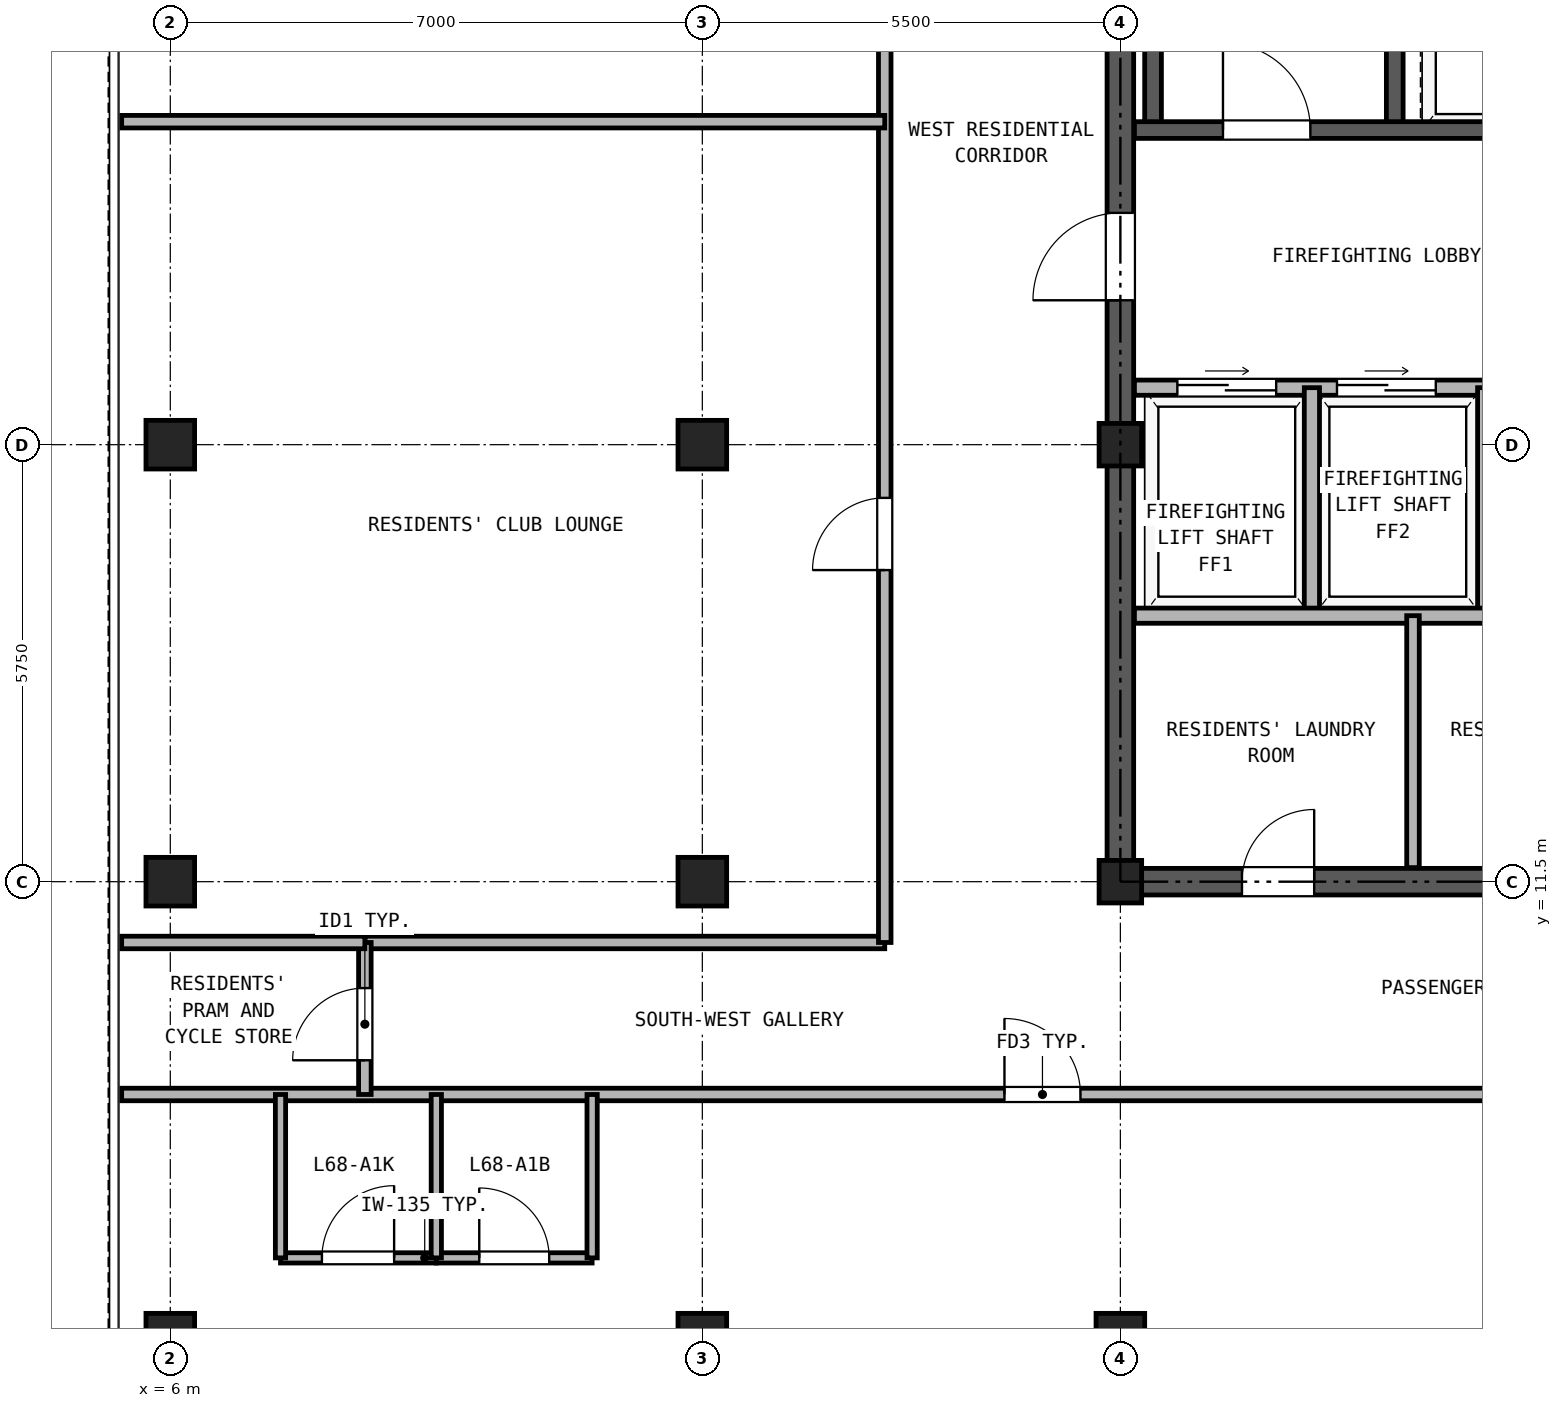
"""IFC4 building model, lengths in metres.
Left out: names, types, materials, properties, quantities, classifications, styles, units other than length and angle.
Written with IfcOpenShell. Run it as: python <this file> out.ifc"""

import sys

from ifc_helpers import new_model, si_unit, direction, frame, frame_2d, origin, origin_2d, place, context, subcontext, project, spatial, rectangle, hollow_rectangle, extrude, source, transform, mapped, element, fill, save


model = new_model("IFC4")
c1 = context("Model", 3, precision=1e-05, world=origin(), true_north=direction((0.0, 1.0)))
c2 = subcontext(c1, "Body", "Model", "MODEL_VIEW")
j1 = project(units=[si_unit("LENGTHUNIT", "METRE"), si_unit("PLANEANGLEUNIT", "RADIAN")], contexts=[c1])
p1 = place(None, origin())
s1 = spatial("IfcSite", under=j1, at=p1, CompositionType="ELEMENT")
p2 = place(p1, origin())
s2 = spatial("IfcBuilding", under=s1, at=p2, CompositionType="ELEMENT")
p3 = place(p2, frame((0.0, 0.0, 239.3)))
s3 = spatial("IfcBuildingStorey", under=s2, at=p3, CompositionType="ELEMENT", Elevation=239.3)
m1 = source(origin(), c2, "Body", "SweptSolid", [
    extrude(hollow_rectangle(XDim=0.64, YDim=0.64, WallThickness=0.035, at=origin_2d()), origin(), (0.0, 0.0, 1.0), 2.98),
])
for number, where, z_axis, x_axis in (
    (1, (6.0, 5.5, 0.0), (0.0, 0.0, 1.0), (1.0, 0.0, 0.0)),
    (2, (6.0, 11.5, 0.0), (0.0, 0.0, 1.0), (1.0, 0.0, 0.0)),
    (3, (6.0, 17.25, 0.0), (0.0, 0.0, 1.0), (1.0, 0.0, 0.0)),
    (4, (13.0, 5.5, 0.0), (0.0, 0.0, 1.0), (1.0, 0.0, 0.0)),
    (5, (13.0, 11.5, 0.0), (0.0, 0.0, 1.0), (1.0, 0.0, 0.0)),
    (6, (13.0, 17.25, 0.0), (0.0, 0.0, 1.0), (1.0, 0.0, 0.0)),
    (7, (18.5, 5.5, 0.0), (0.0, 0.0, 1.0), (1.0, 0.0, 0.0)),
):
    element("IfcColumn", number, at=place(p3, frame(where, z_axis=z_axis, x_axis=x_axis)), inside=s3, PredefinedType="COLUMN", context=c2, shape_type="MappedRepresentation", body=[
        mapped(m1, transform((0.0, 0.0, 0.0), x_axis=(1.0, 0.0, 0.0), y_axis=(0.0, 1.0, 0.0), z_axis=(0.0, 0.0, 1.0), scale=1.0)),
    ])
m2 = source(origin(), c2, "Body", "SweptSolid", [
    extrude(hollow_rectangle(XDim=0.56, YDim=0.56, WallThickness=0.03, at=origin_2d()), origin(), (0.0, 0.0, 1.0), 2.98),
])
for number, where, z_axis, x_axis in (
    (8, (18.5, 11.5, 0.0), (0.0, 0.0, 1.0), (1.0, 0.0, 0.0)),
    (9, (18.5, 17.25, 0.0), (0.0, 0.0, 1.0), (1.0, 0.0, 0.0)),
):
    element("IfcColumn", number, at=place(p3, frame(where, z_axis=z_axis, x_axis=x_axis)), inside=s3, PredefinedType="COLUMN", context=c2, shape_type="MappedRepresentation", body=[
        mapped(m2, transform((0.0, 0.0, 0.0), x_axis=(1.0, 0.0, 0.0), y_axis=(0.0, 1.0, 0.0), z_axis=(0.0, 0.0, 1.0), scale=1.0)),
    ])
p4 = place(p3, frame((18.325, 11.5, 0.0), z_axis=(0.0, 0.0, 1.0), x_axis=(1.0, 0.0, 0.0)))
e10 = element("IfcWall", 10, at=p4, inside=s3, PredefinedType="SHEAR", context=c2, shape_type="SweptSolid", body=[
    extrude(rectangle(XDim=10.35, YDim=0.35, at=frame_2d((5.175, 0.0))), origin(), (0.0, 0.0, 1.0), 2.98),
])
p5 = place(p4, frame((1.775, 0.0, 0.0)))
e11 = element("IfcOpeningElement", 11, at=p5, cuts=e10, PredefinedType="OPENING", context=c2, shape_type="SweptSolid", body=[
    extrude(rectangle(XDim=0.95, YDim=2.15, at=frame_2d((0.475, 1.075))), frame((0.0, 0.185, 0.0), z_axis=(0.0, -1.0, 0.0), x_axis=(1.0, 0.0, 0.0)), (0.0, 0.0, 1.0), 0.37),
])
p6 = place(p4, frame((5.275, 0.0, 0.0)))
e12 = element("IfcOpeningElement", 12, at=p6, cuts=e10, PredefinedType="OPENING", context=c2, shape_type="SweptSolid", body=[
    extrude(rectangle(XDim=0.95, YDim=2.15, at=frame_2d((0.475, 1.075))), frame((0.0, 0.185, 0.0), z_axis=(0.0, -1.0, 0.0), x_axis=(1.0, 0.0, 0.0)), (0.0, 0.0, 1.0), 0.37),
])
p7 = place(p4, frame((8.175, 0.0, 0.0)))
e13 = element("IfcOpeningElement", 13, at=p7, cuts=e10, PredefinedType="OPENING", context=c2, shape_type="SweptSolid", body=[
    extrude(rectangle(XDim=1.1, YDim=2.25, at=frame_2d((0.55, 1.125))), frame((0.0, 0.185, 0.0), z_axis=(0.0, -1.0, 0.0), x_axis=(1.0, 0.0, 0.0)), (0.0, 0.0, 1.0), 0.37),
])
p8 = place(p3, frame((18.5, 11.675, 0.0), z_axis=(0.0, 0.0, 1.0), x_axis=(0.0, 1.0, 0.0)))
e14 = element("IfcWall", 14, at=p8, inside=s3, PredefinedType="SHEAR", context=c2, shape_type="SweptSolid", body=[
    extrude(rectangle(XDim=16.9, YDim=0.35, at=frame_2d((8.45, 0.0))), origin(), (0.0, 0.0, 1.0), 2.98),
])
p9 = place(p8, frame((7.475, 0.0, 0.0)))
e15 = element("IfcOpeningElement", 15, at=p9, cuts=e14, PredefinedType="OPENING", context=c2, shape_type="SweptSolid", body=[
    extrude(rectangle(XDim=1.15, YDim=2.2, at=frame_2d((0.575, 1.1))), frame((0.0, 0.185, 0.0), z_axis=(0.0, -1.0, 0.0), x_axis=(1.0, 0.0, 0.0)), (0.0, 0.0, 1.0), 0.37),
])
for number, where, z_axis, x_axis in (
    (16, (18.93, 21.39, 0.0), (0.0, 0.0, 1.0), (0.0, 1.0, 0.0)),
    (17, (22.11, 21.39, 0.0), (0.0, 0.0, 1.0), (0.0, 1.0, 0.0)),
):
    element("IfcWall", number, at=place(p3, frame(where, z_axis=z_axis, x_axis=x_axis)), inside=s3, PredefinedType="SOLIDWALL", context=c2, shape_type="SweptSolid", body=[
        extrude(rectangle(XDim=7.11, YDim=0.22, at=frame_2d((3.555, 0.0))), origin(), (0.0, 0.0, 1.0), 2.98),
    ])
p10 = place(p3, frame((18.685, 21.39, 0.0), z_axis=(0.0, 0.0, 1.0), x_axis=(1.0, 0.0, 0.0)))
e18 = element("IfcWall", 18, at=p10, inside=s3, PredefinedType="SOLIDWALL", context=c2, shape_type="SweptSolid", body=[
    extrude(rectangle(XDim=6.445, YDim=0.22, at=frame_2d((3.222, 0.0))), origin(), (0.0, 0.0, 1.0), 2.98),
])
p11 = place(p10, frame((1.165, 0.0, 0.0)))
e19 = element("IfcOpeningElement", 19, at=p11, cuts=e18, PredefinedType="OPENING", context=c2, shape_type="SweptSolid", body=[
    extrude(rectangle(XDim=1.15, YDim=2.2, at=frame_2d((0.575, 1.1))), frame((0.0, 0.12, 0.0), z_axis=(0.0, -1.0, 0.0), x_axis=(1.0, 0.0, 0.0)), (0.0, 0.0, 1.0), 0.24),
])
p12 = place(p10, frame((4.895, 0.0, 0.0)))
e20 = element("IfcOpeningElement", 20, at=p12, cuts=e18, PredefinedType="OPENING", context=c2, shape_type="SweptSolid", body=[
    extrude(rectangle(XDim=1.1, YDim=2.25, at=frame_2d((0.55, 1.125))), frame((0.0, 0.12, 0.0), z_axis=(0.0, -1.0, 0.0), x_axis=(1.0, 0.0, 0.0)), (0.0, 0.0, 1.0), 0.24),
])
p13 = place(p3, frame((18.685, 18.0, 0.0), z_axis=(0.0, 0.0, 1.0), x_axis=(1.0, 0.0, 0.0)))
e21 = element("IfcWall", 21, at=p13, inside=s3, PredefinedType="PARTITIONING", context=c2, shape_type="SweptSolid", body=[
    extrude(rectangle(XDim=9.63, YDim=0.2, at=frame_2d((4.815, 0.0))), origin(), (0.0, 0.0, 1.0), 2.98),
])
p14 = place(p13, frame((0.565, 0.0, 0.0)))
e22 = element("IfcOpeningElement", 22, at=p14, cuts=e21, PredefinedType="OPENING", context=c2, shape_type="SweptSolid", body=[
    extrude(rectangle(XDim=1.3, YDim=2.3, at=frame_2d((0.65, 1.15))), frame((0.0, 0.11, 0.0), z_axis=(0.0, -1.0, 0.0), x_axis=(1.0, 0.0, 0.0)), (0.0, 0.0, 1.0), 0.22),
])
p15 = place(p13, frame((2.665, 0.0, 0.0)))
e23 = element("IfcOpeningElement", 23, at=p15, cuts=e21, PredefinedType="OPENING", context=c2, shape_type="SweptSolid", body=[
    extrude(rectangle(XDim=1.3, YDim=2.3, at=frame_2d((0.65, 1.15))), frame((0.0, 0.11, 0.0), z_axis=(0.0, -1.0, 0.0), x_axis=(1.0, 0.0, 0.0)), (0.0, 0.0, 1.0), 0.22),
])
p16 = place(p13, frame((5.065, 0.0, 0.0)))
e24 = element("IfcOpeningElement", 24, at=p16, cuts=e21, PredefinedType="OPENING", context=c2, shape_type="SweptSolid", body=[
    extrude(rectangle(XDim=0.9, YDim=2.05, at=frame_2d((0.45, 1.025))), frame((0.0, 0.11, 0.0), z_axis=(0.0, -1.0, 0.0), x_axis=(1.0, 0.0, 0.0)), (0.0, 0.0, 1.0), 0.22),
])
p17 = place(p13, frame((7.765, 0.0, 0.0)))
e25 = element("IfcOpeningElement", 25, at=p17, cuts=e21, PredefinedType="OPENING", context=c2, shape_type="SweptSolid", body=[
    extrude(rectangle(XDim=0.9, YDim=2.05, at=frame_2d((0.45, 1.025))), frame((0.0, 0.11, 0.0), z_axis=(0.0, -1.0, 0.0), x_axis=(1.0, 0.0, 0.0)), (0.0, 0.0, 1.0), 0.22),
])
for number, where, z_axis, x_axis in (
    (26, (21.02, 15.0, 0.0), (0.0, 0.0, 1.0), (0.0, 1.0, 0.0)),
    (27, (23.3, 15.0, 0.0), (0.0, 0.0, 1.0), (0.0, 1.0, 0.0)),
):
    element("IfcWall", number, at=place(p3, frame(where, z_axis=z_axis, x_axis=x_axis)), inside=s3, PredefinedType="PARTITIONING", context=c2, shape_type="SweptSolid", body=[
        extrude(rectangle(XDim=3.0, YDim=0.2, at=frame_2d((1.5, 0.0))), origin(), (0.0, 0.0, 1.0), 2.98),
    ])
p18 = place(p3, frame((18.685, 15.0, 0.0), z_axis=(0.0, 0.0, 1.0), x_axis=(1.0, 0.0, 0.0)))
e28 = element("IfcWall", 28, at=p18, inside=s3, PredefinedType="PARTITIONING", context=c2, shape_type="SweptSolid", body=[
    extrude(rectangle(XDim=9.63, YDim=0.2, at=frame_2d((4.815, 0.0))), origin(), (0.0, 0.0, 1.0), 2.98),
])
p19 = place(p3, frame((22.35, 11.685, 0.0), z_axis=(0.0, 0.0, 1.0), x_axis=(0.0, 1.0, 0.0)))
e29 = element("IfcWall", 29, at=p19, inside=s3, PredefinedType="PARTITIONING", context=c2, shape_type="SweptSolid", body=[
    extrude(rectangle(XDim=3.315, YDim=0.165, at=frame_2d((1.657, 0.0))), origin(), (0.0, 0.0, 1.0), 2.98),
])
p20 = place(p3, frame((5.36, 8.7, 0.0), z_axis=(0.0, 0.0, 1.0), x_axis=(1.0, 0.0, 0.0)))
e30 = element("IfcWall", 30, at=p20, inside=s3, PredefinedType="PARTITIONING", context=c2, shape_type="SweptSolid", body=[
    extrude(rectangle(XDim=36.28, YDim=0.165, at=frame_2d((18.14, 0.0))), origin(), (0.0, 0.0, 1.0), 2.655),
])
p21 = place(p20, frame((11.615, 0.0, 0.0)))
e31 = element("IfcOpeningElement", 31, at=p21, cuts=e30, PredefinedType="OPENING", context=c2, shape_type="SweptSolid", body=[
    extrude(rectangle(XDim=1.0, YDim=2.15, at=frame_2d((0.5, 1.075))), frame((0.0, 0.093, 0.0), z_axis=(0.0, -1.0, 0.0), x_axis=(1.0, 0.0, 0.0)), (0.0, 0.0, 1.0), 0.185),
])
p22 = place(p20, frame((23.665, 0.0, 0.0)))
e32 = element("IfcOpeningElement", 32, at=p22, cuts=e30, PredefinedType="OPENING", context=c2, shape_type="SweptSolid", body=[
    extrude(rectangle(XDim=1.0, YDim=2.15, at=frame_2d((0.5, 1.075))), frame((0.0, 0.093, 0.0), z_axis=(0.0, -1.0, 0.0), x_axis=(1.0, 0.0, 0.0)), (0.0, 0.0, 1.0), 0.185),
])
p23 = place(p3, frame((8.56, 10.7, 0.0), z_axis=(0.0, 0.0, 1.0), x_axis=(1.0, 0.0, 0.0)))
e33 = element("IfcWall", 33, at=p23, inside=s3, PredefinedType="PARTITIONING", context=c2, shape_type="SweptSolid", body=[
    extrude(rectangle(XDim=6.84, YDim=0.165, at=frame_2d((3.42, 0.0))), origin(), (0.0, 0.0, 1.0), 2.98),
])
p24 = place(p3, frame((8.56, 8.7, 0.0), z_axis=(0.0, 0.0, 1.0), x_axis=(0.0, 1.0, 0.0)))
e34 = element("IfcWall", 34, at=p24, inside=s3, PredefinedType="PARTITIONING", context=c2, shape_type="SweptSolid", body=[
    extrude(rectangle(XDim=2.0, YDim=0.165, at=frame_2d((1.0, 0.0))), origin(), (0.0, 0.0, 1.0), 2.98),
])
p25 = place(p24, frame((0.45, 0.0, 0.0)))
e35 = element("IfcOpeningElement", 35, at=p25, cuts=e34, PredefinedType="OPENING", context=c2, shape_type="SweptSolid", body=[
    extrude(rectangle(XDim=0.95, YDim=2.15, at=frame_2d((0.475, 1.075))), frame((0.0, 0.093, 0.0), z_axis=(0.0, -1.0, 0.0), x_axis=(1.0, 0.0, 0.0)), (0.0, 0.0, 1.0), 0.185),
])
p26 = place(p3, frame((15.4, 10.7, 0.0), z_axis=(0.0, 0.0, 1.0), x_axis=(0.0, 1.0, 0.0)))
e36 = element("IfcWall", 36, at=p26, inside=s3, PredefinedType="PARTITIONING", context=c2, shape_type="SweptSolid", body=[
    extrude(rectangle(XDim=24.44, YDim=0.165, at=frame_2d((12.22, 0.0))), origin(), (0.0, 0.0, 1.0), 2.98),
])
p27 = place(p26, frame((4.9, 0.0, 0.0)))
e37 = element("IfcOpeningElement", 37, at=p27, cuts=e36, PredefinedType="OPENING", context=c2, shape_type="SweptSolid", body=[
    extrude(rectangle(XDim=0.95, YDim=2.15, at=frame_2d((0.475, 1.075))), frame((0.0, 0.093, 0.0), z_axis=(0.0, -1.0, 0.0), x_axis=(1.0, 0.0, 0.0)), (0.0, 0.0, 1.0), 0.185),
])
p28 = place(p26, frame((13.8, 0.0, 0.0)))
e38 = element("IfcOpeningElement", 38, at=p28, cuts=e36, PredefinedType="OPENING", context=c2, shape_type="SweptSolid", body=[
    extrude(rectangle(XDim=0.95, YDim=2.15, at=frame_2d((0.475, 1.075))), frame((0.0, 0.093, 0.0), z_axis=(0.0, -1.0, 0.0), x_axis=(1.0, 0.0, 0.0)), (0.0, 0.0, 1.0), 0.185),
])
p29 = place(p26, frame((18.7, 0.0, 0.0)))
e39 = element("IfcOpeningElement", 39, at=p29, cuts=e36, PredefinedType="OPENING", context=c2, shape_type="SweptSolid", body=[
    extrude(rectangle(XDim=0.95, YDim=2.15, at=frame_2d((0.475, 1.075))), frame((0.0, 0.093, 0.0), z_axis=(0.0, -1.0, 0.0), x_axis=(1.0, 0.0, 0.0)), (0.0, 0.0, 1.0), 0.185),
])
p30 = place(p3, frame((7.45, 6.55, 0.0), z_axis=(0.0, 0.0, 1.0), x_axis=(1.0, 0.0, 0.0)))
e40 = element("IfcWall", 40, at=p30, inside=s3, PredefinedType="PARTITIONING", context=c2, shape_type="SweptSolid", body=[
    extrude(rectangle(XDim=2.05, YDim=0.135, at=frame_2d((1.025, 0.0))), origin(), (0.0, 0.0, 1.0), 2.98),
])
p31 = place(p30, frame((0.545, 0.0, 0.0)))
e41 = element("IfcOpeningElement", 41, at=p31, cuts=e40, PredefinedType="OPENING", context=c2, shape_type="SweptSolid", body=[
    extrude(rectangle(XDim=0.95, YDim=2.15, at=frame_2d((0.475, 1.075))), frame((0.0, 0.077, 0.0), z_axis=(0.0, -1.0, 0.0), x_axis=(1.0, 0.0, 0.0)), (0.0, 0.0, 1.0), 0.155),
])
p32 = place(p3, frame((9.5, 6.55, 0.0), z_axis=(0.0, 0.0, 1.0), x_axis=(1.0, 0.0, 0.0)))
e42 = element("IfcWall", 42, at=p32, inside=s3, PredefinedType="PARTITIONING", context=c2, shape_type="SweptSolid", body=[
    extrude(rectangle(XDim=2.05, YDim=0.135, at=frame_2d((1.025, 0.0))), origin(), (0.0, 0.0, 1.0), 2.98),
])
p33 = place(p32, frame((0.565, 0.0, 0.0)))
e43 = element("IfcOpeningElement", 43, at=p33, cuts=e42, PredefinedType="OPENING", context=c2, shape_type="SweptSolid", body=[
    extrude(rectangle(XDim=0.92, YDim=2.1, at=frame_2d((0.46, 1.05))), frame((0.0, 0.077, 0.0), z_axis=(0.0, -1.0, 0.0), x_axis=(1.0, 0.0, 0.0)), (0.0, 0.0, 1.0), 0.155),
])
for number, where, z_axis, x_axis in (
    (44, (7.45, 6.55, 0.0), (0.0, 0.0, 1.0), (0.0, 1.0, 0.0)),
    (45, (9.5, 6.55, 0.0), (0.0, 0.0, 1.0), (0.0, 1.0, 0.0)),
    (46, (11.55, 6.55, 0.0), (0.0, 0.0, 1.0), (0.0, 1.0, 0.0)),
):
    element("IfcWall", number, at=place(p3, frame(where, z_axis=z_axis, x_axis=x_axis)), inside=s3, PredefinedType="PARTITIONING", context=c2, shape_type="SweptSolid", body=[
        extrude(rectangle(XDim=2.15, YDim=0.135, at=frame_2d((1.075, 0.0))), origin(), (0.0, 0.0, 1.0), 2.98),
    ])
p34 = place(p3, frame((5.36, 10.7, 0.0), z_axis=(0.0, 0.0, 1.0), x_axis=(1.0, 0.0, 0.0)))
e47 = element("IfcWall", 47, at=p34, inside=s3, PredefinedType="PARTITIONING", context=c2, shape_type="SweptSolid", body=[
    extrude(rectangle(XDim=3.2, YDim=0.165, at=frame_2d((1.6, 0.0))), origin(), (0.0, 0.0, 1.0), 2.98),
])
p35 = place(p3, frame((5.36, 21.5, 0.0), z_axis=(0.0, 0.0, 1.0), x_axis=(1.0, 0.0, 0.0)))
e48 = element("IfcWall", 48, at=p35, inside=s3, PredefinedType="PARTITIONING", context=c2, shape_type="SweptSolid", body=[
    extrude(rectangle(XDim=10.04, YDim=0.165, at=frame_2d((5.02, 0.0))), origin(), (0.0, 0.0, 1.0), 2.98),
])
p36 = place(p11, frame((1.15, 0.0, 0.0), z_axis=(0.0, 0.0, 1.0), x_axis=(-1.0, 0.0, 0.0)))
e49 = element("IfcDoor", 49, at=p36, inside=s3, OperationType="SINGLE_SWING_LEFT", PredefinedType="DOOR", context=c2, shape_type="SweptSolid", body=[
    extrude(rectangle(XDim=1.15, YDim=2.2, at=frame_2d((0.575, 1.1))), frame((0.0, 0.025, 0.0), z_axis=(0.0, -1.0, 0.0), x_axis=(1.0, 0.0, 0.0)), (0.0, 0.0, 1.0), 0.05),
])
fill(e19, e49)
p37 = place(p14, origin())
e50 = element("IfcDoor", 50, at=p37, inside=s3, OperationType="DOUBLE_DOOR_SLIDING", PredefinedType="DOOR", context=c2, shape_type="SweptSolid", body=[
    extrude(rectangle(XDim=1.3, YDim=2.3, at=frame_2d((0.65, 1.15))), frame((0.0, 0.025, 0.0), z_axis=(0.0, -1.0, 0.0), x_axis=(1.0, 0.0, 0.0)), (0.0, 0.0, 1.0), 0.05),
])
fill(e22, e50)
p38 = place(p15, origin())
e51 = element("IfcDoor", 51, at=p38, inside=s3, OperationType="DOUBLE_DOOR_SLIDING", PredefinedType="DOOR", context=c2, shape_type="SweptSolid", body=[
    extrude(rectangle(XDim=1.3, YDim=2.3, at=frame_2d((0.65, 1.15))), frame((0.0, 0.025, 0.0), z_axis=(0.0, -1.0, 0.0), x_axis=(1.0, 0.0, 0.0)), (0.0, 0.0, 1.0), 0.05),
])
fill(e23, e51)
p39 = place(p9, frame((1.15, 0.0, 0.0), z_axis=(0.0, 0.0, 1.0), x_axis=(-1.0, 0.0, 0.0)))
e52 = element("IfcDoor", 52, at=p39, inside=s3, OperationType="SINGLE_SWING_LEFT", PredefinedType="DOOR", context=c2, shape_type="SweptSolid", body=[
    extrude(rectangle(XDim=1.15, YDim=2.2, at=frame_2d((0.575, 1.1))), frame((0.0, 0.025, 0.0), z_axis=(0.0, -1.0, 0.0), x_axis=(1.0, 0.0, 0.0)), (0.0, 0.0, 1.0), 0.05),
])
fill(e15, e52)
p40 = place(p5, frame((0.95, 0.0, 0.0), z_axis=(0.0, 0.0, 1.0), x_axis=(-1.0, 0.0, 0.0)))
e53 = element("IfcDoor", 53, at=p40, inside=s3, OperationType="SINGLE_SWING_RIGHT", PredefinedType="DOOR", context=c2, shape_type="SweptSolid", body=[
    extrude(rectangle(XDim=0.95, YDim=2.15, at=frame_2d((0.475, 1.075))), frame((0.0, 0.025, 0.0), z_axis=(0.0, -1.0, 0.0), x_axis=(1.0, 0.0, 0.0)), (0.0, 0.0, 1.0), 0.05),
])
fill(e11, e53)
p41 = place(p31, origin())
e54 = element("IfcDoor", 54, at=p41, inside=s3, OperationType="SINGLE_SWING_RIGHT", PredefinedType="DOOR", context=c2, shape_type="SweptSolid", body=[
    extrude(rectangle(XDim=0.95, YDim=2.15, at=frame_2d((0.475, 1.075))), frame((0.0, 0.025, 0.0), z_axis=(0.0, -1.0, 0.0), x_axis=(1.0, 0.0, 0.0)), (0.0, 0.0, 1.0), 0.05),
])
fill(e41, e54)
p42 = place(p33, origin())
e55 = element("IfcDoor", 55, at=p42, inside=s3, OperationType="SINGLE_SWING_LEFT", PredefinedType="DOOR", context=c2, shape_type="SweptSolid", body=[
    extrude(rectangle(XDim=0.92, YDim=2.1, at=frame_2d((0.46, 1.05))), frame((0.0, 0.025, 0.0), z_axis=(0.0, -1.0, 0.0), x_axis=(1.0, 0.0, 0.0)), (0.0, 0.0, 1.0), 0.05),
])
fill(e43, e55)
p43 = place(p21, frame((1.0, 0.0, 0.0), z_axis=(0.0, 0.0, 1.0), x_axis=(-1.0, 0.0, 0.0)))
e56 = element("IfcDoor", 56, at=p43, inside=s3, OperationType="SINGLE_SWING_LEFT", PredefinedType="DOOR", context=c2, shape_type="SweptSolid", body=[
    extrude(rectangle(XDim=1.0, YDim=2.15, at=frame_2d((0.5, 1.075))), frame((0.0, 0.025, 0.0), z_axis=(0.0, -1.0, 0.0), x_axis=(1.0, 0.0, 0.0)), (0.0, 0.0, 1.0), 0.05),
])
fill(e31, e56)
p44 = place(p25, frame((0.95, 0.0, 0.0), z_axis=(0.0, 0.0, 1.0), x_axis=(-1.0, 0.0, 0.0)))
e57 = element("IfcDoor", 57, at=p44, inside=s3, OperationType="SINGLE_SWING_LEFT", PredefinedType="DOOR", context=c2, shape_type="SweptSolid", body=[
    extrude(rectangle(XDim=0.95, YDim=2.15, at=frame_2d((0.475, 1.075))), frame((0.0, 0.025, 0.0), z_axis=(0.0, -1.0, 0.0), x_axis=(1.0, 0.0, 0.0)), (0.0, 0.0, 1.0), 0.05),
])
fill(e35, e57)
p45 = place(p27, frame((0.95, 0.0, 0.0), z_axis=(0.0, 0.0, 1.0), x_axis=(-1.0, 0.0, 0.0)))
e58 = element("IfcDoor", 58, at=p45, inside=s3, OperationType="SINGLE_SWING_LEFT", PredefinedType="DOOR", context=c2, shape_type="SweptSolid", body=[
    extrude(rectangle(XDim=0.95, YDim=2.15, at=frame_2d((0.475, 1.075))), frame((0.0, 0.025, 0.0), z_axis=(0.0, -1.0, 0.0), x_axis=(1.0, 0.0, 0.0)), (0.0, 0.0, 1.0), 0.05),
])
fill(e37, e58)
save(model, sys.argv[1])
